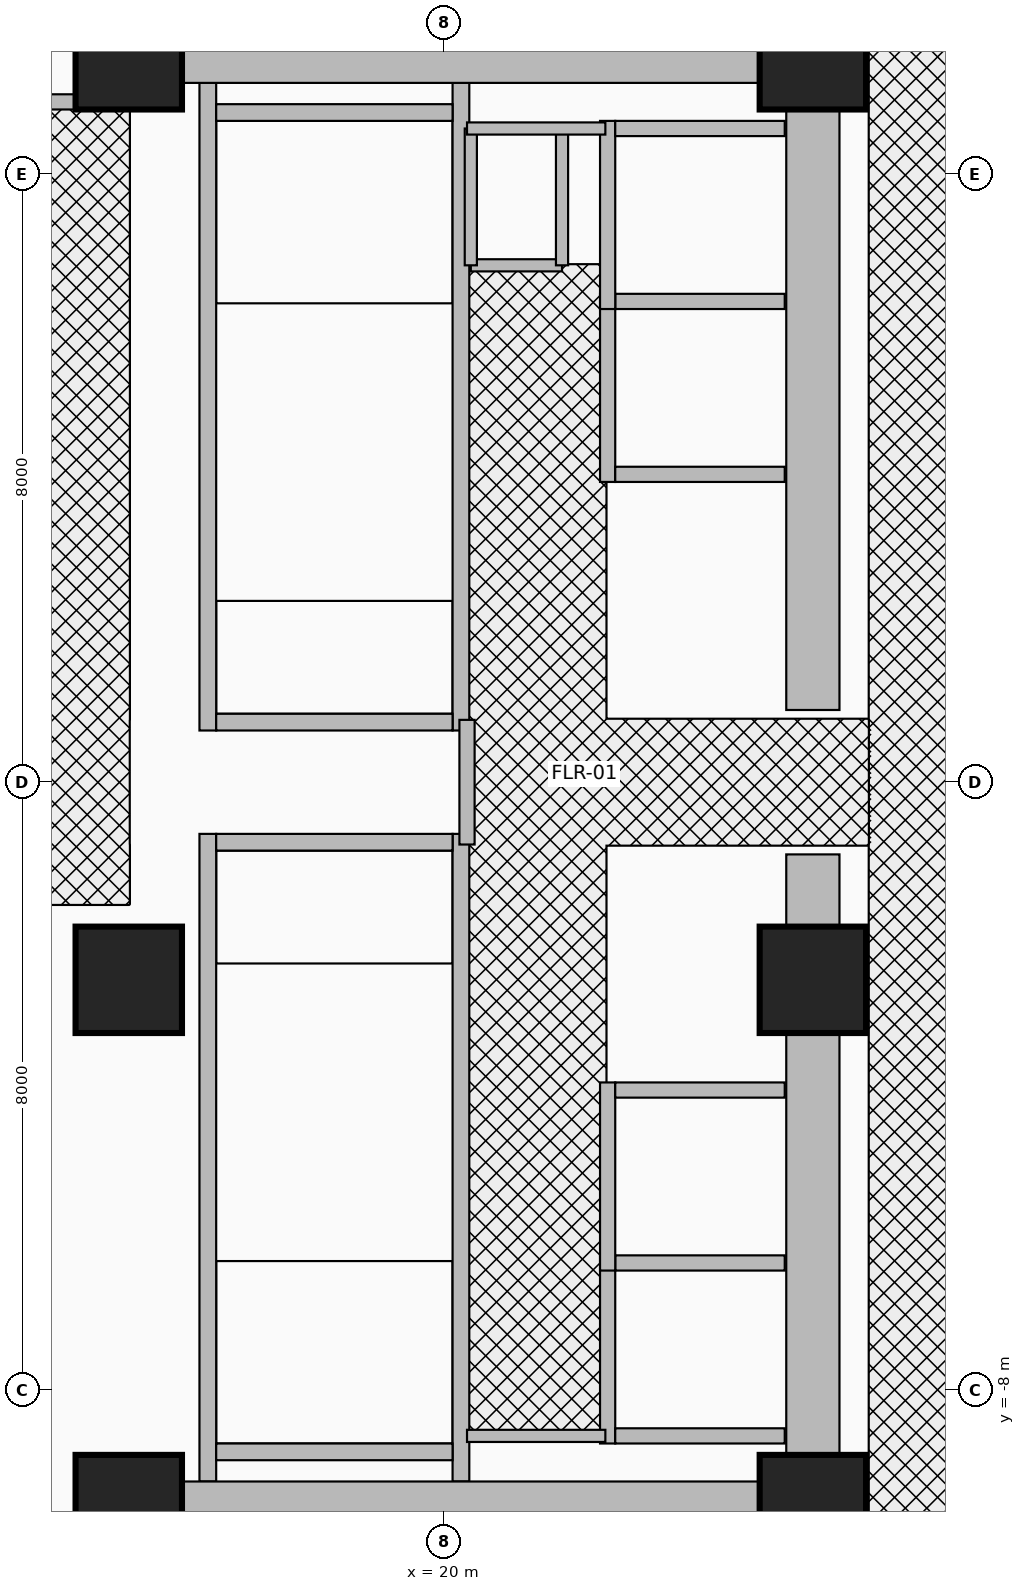
"""IFC4 building model, lengths in metres.
Left out: names, types, materials, properties, quantities, classifications, styles, units other than length and angle.
Written with IfcOpenShell. Run it as: python <this file> out.ifc"""

import sys

from ifc_helpers import new_model, si_unit, direction, frame, frame_2d, origin, origin_2d, place, context, subcontext, project, spatial, rectangle, extrude, source, transform, mapped, element, fill, save


model = new_model("IFC4")
c1 = context("Model", 3, precision=1e-05, world=origin(), true_north=direction((0.0, 1.0)))
c2 = subcontext(c1, "Body", "Model", "MODEL_VIEW")
j1 = project(units=[si_unit("LENGTHUNIT", "METRE"), si_unit("PLANEANGLEUNIT", "RADIAN")], contexts=[c1])
p1 = place(None, origin())
s1 = spatial("IfcSite", under=j1, at=p1, CompositionType="ELEMENT")
p2 = place(p1, origin())
s2 = spatial("IfcBuilding", under=s1, at=p2, CompositionType="ELEMENT")
p3 = place(p2, frame((0.0, 0.0, 20.8)))
s3 = spatial("IfcBuildingStorey", under=s2, at=p3, CompositionType="ELEMENT", Elevation=20.8)
for number, where, z_axis, x_axis in (
    (1, (16.89, 0.68, 0.0), (0.0, 0.0, 1.0), (0.0, 1.0, 0.0)),
    (2, (20.22, 0.68, 0.0), (0.0, 0.0, 1.0), (0.0, 1.0, 0.0)),
):
    element("IfcWall", number, at=place(p3, frame(where, z_axis=z_axis, x_axis=x_axis)), inside=s3, PredefinedType="SHEAR", context=c2, shape_type="SweptSolid", body=[
        extrude(rectangle(XDim=8.52, YDim=0.22, at=frame_2d((4.26, 0.0))), origin(), (0.0, 0.0, 1.0), 4.96),
    ])
p4 = place(p3, frame((17.0, 0.79, 0.0), z_axis=(0.0, 0.0, 1.0), x_axis=(1.0, 0.0, 0.0)))
e3 = element("IfcWall", 3, at=p4, inside=s3, PredefinedType="SHEAR", context=c2, shape_type="SweptSolid", body=[
    extrude(rectangle(XDim=3.11, YDim=0.22, at=frame_2d((1.555, 0.0))), origin(), (0.0, 0.0, 1.0), 4.96),
])
p5 = place(p4, frame((0.95, 0.0, 0.0)))
e4 = element("IfcOpeningElement", 4, at=p5, cuts=e3, PredefinedType="OPENING", context=c2, shape_type="SweptSolid", body=[
    extrude(rectangle(XDim=1.1, YDim=2.15, at=frame_2d((0.55, 1.075))), frame((0.0, 0.125, 0.0), z_axis=(0.0, -1.0, 0.0), x_axis=(1.0, 0.0, 0.0)), (0.0, 0.0, 1.0), 0.25),
])
p6 = place(p3, frame((17.0, 8.81, 0.0), z_axis=(0.0, 0.0, 1.0), x_axis=(1.0, 0.0, 0.0)))
e5 = element("IfcWall", 5, at=p6, inside=s3, PredefinedType="SHEAR", context=c2, shape_type="SweptSolid", body=[
    extrude(rectangle(XDim=3.11, YDim=0.22, at=frame_2d((1.555, 0.0))), origin(), (0.0, 0.0, 1.0), 4.96),
])
for number, where, z_axis, x_axis in (
    (6, (16.89, -9.2, 0.0), (0.0, 0.0, 1.0), (0.0, 1.0, 0.0)),
    (7, (20.22, -9.2, 0.0), (0.0, 0.0, 1.0), (0.0, 1.0, 0.0)),
):
    element("IfcWall", number, at=place(p3, frame(where, z_axis=z_axis, x_axis=x_axis)), inside=s3, PredefinedType="SHEAR", context=c2, shape_type="SweptSolid", body=[
        extrude(rectangle(XDim=8.52, YDim=0.22, at=frame_2d((4.26, 0.0))), origin(), (0.0, 0.0, 1.0), 4.96),
    ])
p7 = place(p3, frame((17.0, -8.81, 0.0), z_axis=(0.0, 0.0, 1.0), x_axis=(1.0, 0.0, 0.0)))
e8 = element("IfcWall", 8, at=p7, inside=s3, PredefinedType="SHEAR", context=c2, shape_type="SweptSolid", body=[
    extrude(rectangle(XDim=3.11, YDim=0.22, at=frame_2d((1.555, 0.0))), origin(), (0.0, 0.0, 1.0), 4.96),
])
p8 = place(p3, frame((17.0, -0.79, 0.0), z_axis=(0.0, 0.0, 1.0), x_axis=(1.0, 0.0, 0.0)))
e9 = element("IfcWall", 9, at=p8, inside=s3, PredefinedType="SHEAR", context=c2, shape_type="SweptSolid", body=[
    extrude(rectangle(XDim=3.11, YDim=0.22, at=frame_2d((1.555, 0.0))), origin(), (0.0, 0.0, 1.0), 4.96),
])
p9 = place(p8, frame((0.95, 0.0, 0.0)))
e10 = element("IfcOpeningElement", 10, at=p9, cuts=e9, PredefinedType="OPENING", context=c2, shape_type="SweptSolid", body=[
    extrude(rectangle(XDim=1.1, YDim=2.15, at=frame_2d((0.55, 1.075))), frame((0.0, 0.125, 0.0), z_axis=(0.0, -1.0, 0.0), x_axis=(1.0, 0.0, 0.0)), (0.0, 0.0, 1.0), 0.25),
])
for number, where, z_axis, x_axis in (
    (11, (24.85, -9.9, 0.0), (0.0, 0.0, 1.0), (0.0, 1.0, 0.0)),
    (12, (24.85, 0.95, 0.0), (0.0, 0.0, 1.0), (0.0, 1.0, 0.0)),
):
    element("IfcWall", number, at=place(p3, frame(where, z_axis=z_axis, x_axis=x_axis)), inside=s3, PredefinedType="SHEAR", context=c2, shape_type="SweptSolid", body=[
        extrude(rectangle(XDim=8.95, YDim=0.7, at=frame_2d((4.475, 0.0))), origin(), (0.0, 0.0, 1.0), 4.96),
    ])
for number, where, z_axis, x_axis in (
    (13, (15.85, 9.55, 0.0), (0.0, 0.0, 1.0), (1.0, 0.0, 0.0)),
    (14, (15.85, -9.55, 0.0), (0.0, 0.0, 1.0), (1.0, 0.0, 0.0)),
):
    element("IfcWall", number, at=place(p3, frame(where, z_axis=z_axis, x_axis=x_axis)), inside=s3, PredefinedType="SHEAR", context=c2, shape_type="SweptSolid", body=[
        extrude(rectangle(XDim=9.0, YDim=0.7, at=frame_2d((4.5, 0.0))), origin(), (0.0, 0.0, 1.0), 4.96),
    ])
m1 = source(origin(), c2, "Body", "SweptSolid", [
    extrude(rectangle(XDim=1.4, YDim=1.4, at=origin_2d()), origin(), (0.0, 0.0, 1.0), 5.2),
])
for number, where, z_axis, x_axis in (
    (15, (15.85, -9.55, 0.0), (0.0, 0.0, 1.0), (1.0, 0.0, 0.0)),
    (16, (24.85, -9.55, 0.0), (0.0, 0.0, 1.0), (1.0, 0.0, 0.0)),
    (17, (15.85, -2.6, 0.0), (0.0, 0.0, 1.0), (1.0, 0.0, 0.0)),
    (18, (24.85, -2.6, 0.0), (0.0, 0.0, 1.0), (1.0, 0.0, 0.0)),
    (19, (15.85, 9.55, 0.0), (0.0, 0.0, 1.0), (1.0, 0.0, 0.0)),
    (20, (24.85, 9.55, 0.0), (0.0, 0.0, 1.0), (1.0, 0.0, 0.0)),
):
    element("IfcColumn", number, at=place(p3, frame(where, z_axis=z_axis, x_axis=x_axis)), inside=s3, PredefinedType="COLUMN", context=c2, shape_type="MappedRepresentation", body=[
        mapped(m1, transform((0.0, 0.0, 0.0), x_axis=(1.0, 0.0, 0.0), y_axis=(0.0, 1.0, 0.0), z_axis=(0.0, 0.0, 1.0), scale=1.0)),
    ])
p10 = place(p3, frame((22.15, -8.7, 0.0), z_axis=(0.0, 0.0, 1.0), x_axis=(0.0, 1.0, 0.0)))
e21 = element("IfcWall", 21, at=p10, inside=s3, PredefinedType="MOVABLE", context=c2, shape_type="SweptSolid", body=[
    extrude(rectangle(XDim=2.475, YDim=0.2, at=frame_2d((1.237, 0.0))), origin(), (0.0, 0.0, 1.0), 4.96),
])
p11 = place(p10, frame((0.688, 0.0, 0.0)))
e22 = element("IfcOpeningElement", 22, at=p11, cuts=e21, PredefinedType="OPENING", context=c2, shape_type="SweptSolid", body=[
    extrude(rectangle(XDim=1.1, YDim=2.1, at=frame_2d((0.55, 1.05))), frame((0.0, 0.115, 0.0), z_axis=(0.0, -1.0, 0.0), x_axis=(1.0, 0.0, 0.0)), (0.0, 0.0, 1.0), 0.23),
])
for number, where, z_axis, x_axis in (
    (23, (22.25, -8.6, 0.0), (0.0, 0.0, 1.0), (1.0, 0.0, 0.0)),
    (24, (22.25, -6.325, 0.0), (0.0, 0.0, 1.0), (1.0, 0.0, 0.0)),
):
    element("IfcWall", number, at=place(p3, frame(where, z_axis=z_axis, x_axis=x_axis)), inside=s3, PredefinedType="MOVABLE", context=c2, shape_type="SweptSolid", body=[
        extrude(rectangle(XDim=2.23, YDim=0.2, at=frame_2d((1.115, 0.0))), origin(), (0.0, 0.0, 1.0), 4.96),
    ])
p12 = place(p3, frame((22.15, -6.425, 0.0), z_axis=(0.0, 0.0, 1.0), x_axis=(0.0, 1.0, 0.0)))
e25 = element("IfcWall", 25, at=p12, inside=s3, PredefinedType="MOVABLE", context=c2, shape_type="SweptSolid", body=[
    extrude(rectangle(XDim=2.475, YDim=0.2, at=frame_2d((1.238, 0.0))), origin(), (0.0, 0.0, 1.0), 4.96),
])
p13 = place(p12, frame((0.688, 0.0, 0.0)))
e26 = element("IfcOpeningElement", 26, at=p13, cuts=e25, PredefinedType="OPENING", context=c2, shape_type="SweptSolid", body=[
    extrude(rectangle(XDim=1.1, YDim=2.1, at=frame_2d((0.55, 1.05))), frame((0.0, 0.115, 0.0), z_axis=(0.0, -1.0, 0.0), x_axis=(1.0, 0.0, 0.0)), (0.0, 0.0, 1.0), 0.23),
])
p14 = place(p3, frame((22.25, -4.05, 0.0), z_axis=(0.0, 0.0, 1.0), x_axis=(1.0, 0.0, 0.0)))
e27 = element("IfcWall", 27, at=p14, inside=s3, PredefinedType="MOVABLE", context=c2, shape_type="SweptSolid", body=[
    extrude(rectangle(XDim=2.23, YDim=0.2, at=frame_2d((1.115, 0.0))), origin(), (0.0, 0.0, 1.0), 4.96),
])
p15 = place(p3, frame((22.15, 3.95, 0.0), z_axis=(0.0, 0.0, 1.0), x_axis=(0.0, 1.0, 0.0)))
e28 = element("IfcWall", 28, at=p15, inside=s3, PredefinedType="MOVABLE", context=c2, shape_type="SweptSolid", body=[
    extrude(rectangle(XDim=2.475, YDim=0.2, at=frame_2d((1.238, 0.0))), origin(), (0.0, 0.0, 1.0), 4.96),
])
for number, where, z_axis, x_axis in (
    (29, (22.25, 4.05, 0.0), (0.0, 0.0, 1.0), (1.0, 0.0, 0.0)),
    (30, (22.25, 6.325, 0.0), (0.0, 0.0, 1.0), (1.0, 0.0, 0.0)),
):
    element("IfcWall", number, at=place(p3, frame(where, z_axis=z_axis, x_axis=x_axis)), inside=s3, PredefinedType="MOVABLE", context=c2, shape_type="SweptSolid", body=[
        extrude(rectangle(XDim=2.23, YDim=0.2, at=frame_2d((1.115, 0.0))), origin(), (0.0, 0.0, 1.0), 3.745),
    ])
p16 = place(p3, frame((22.15, 6.225, 0.0), z_axis=(0.0, 0.0, 1.0), x_axis=(0.0, 1.0, 0.0)))
e31 = element("IfcWall", 31, at=p16, inside=s3, PredefinedType="MOVABLE", context=c2, shape_type="SweptSolid", body=[
    extrude(rectangle(XDim=2.475, YDim=0.2, at=frame_2d((1.237, 0.0))), origin(), (0.0, 0.0, 1.0), 4.96),
])
p17 = place(p3, frame((22.25, 8.6, 0.0), z_axis=(0.0, 0.0, 1.0), x_axis=(1.0, 0.0, 0.0)))
e32 = element("IfcWall", 32, at=p17, inside=s3, PredefinedType="MOVABLE", context=c2, shape_type="SweptSolid", body=[
    extrude(rectangle(XDim=2.23, YDim=0.2, at=frame_2d((1.115, 0.0))), origin(), (0.0, 0.0, 1.0), 3.745),
])
p18 = place(p3, frame((20.3, -0.82, 0.0), z_axis=(0.0, 0.0, 1.0), x_axis=(0.0, 1.0, 0.0)))
e33 = element("IfcWall", 33, at=p18, inside=s3, PredefinedType="PARTITIONING", context=c2, shape_type="SweptSolid", body=[
    extrude(rectangle(XDim=1.64, YDim=0.2, at=frame_2d((0.82, 0.0))), origin(), (0.0, 0.0, 1.0), 4.96),
])
p19 = place(p18, frame((0.295, 0.0, 0.0)))
e34 = element("IfcOpeningElement", 34, at=p19, cuts=e33, PredefinedType="OPENING", context=c2, shape_type="SweptSolid", body=[
    extrude(rectangle(XDim=1.05, YDim=2.15, at=frame_2d((0.525, 1.075))), frame((0.0, 0.115, 0.0), z_axis=(0.0, -1.0, 0.0), x_axis=(1.0, 0.0, 0.0)), (0.0, 0.0, 1.0), 0.23),
])
p20 = place(p3, frame((20.35, 6.8, 0.0), z_axis=(0.0, 0.0, 1.0), x_axis=(1.0, 0.0, 0.0)))
e35 = element("IfcWall", 35, at=p20, inside=s3, PredefinedType="PARTITIONING", context=c2, shape_type="SweptSolid", body=[
    extrude(rectangle(XDim=1.2, YDim=0.16, at=frame_2d((0.6, 0.0))), origin(), (0.0, 0.0, 1.0), 4.96),
])
p21 = place(p20, frame((0.175, 0.0, 0.0)))
e36 = element("IfcOpeningElement", 36, at=p21, cuts=e35, PredefinedType="OPENING", context=c2, shape_type="SweptSolid", body=[
    extrude(rectangle(XDim=0.85, YDim=2.05, at=frame_2d((0.425, 1.025))), frame((0.0, 0.095, 0.0), z_axis=(0.0, -1.0, 0.0), x_axis=(1.0, 0.0, 0.0)), (0.0, 0.0, 1.0), 0.19),
])
for number, where, z_axis, x_axis in (
    (37, (21.55, 6.8, 0.0), (0.0, 0.0, 1.0), (0.0, 1.0, 0.0)),
    (38, (20.35, 6.8, 0.0), (0.0, 0.0, 1.0), (0.0, 1.0, 0.0)),
):
    element("IfcWall", number, at=place(p3, frame(where, z_axis=z_axis, x_axis=x_axis)), inside=s3, PredefinedType="PARTITIONING", context=c2, shape_type="SweptSolid", body=[
        extrude(rectangle(XDim=1.8, YDim=0.16, at=frame_2d((0.9, 0.0))), origin(), (0.0, 0.0, 1.0), 4.96),
    ])
for number, where, z_axis, x_axis in (
    (39, (20.3, -8.6, 0.0), (0.0, 0.0, 1.0), (1.0, 0.0, 0.0)),
    (40, (20.3, 8.6, 0.0), (0.0, 0.0, 1.0), (1.0, 0.0, 0.0)),
):
    element("IfcWall", number, at=place(p3, frame(where, z_axis=z_axis, x_axis=x_axis)), inside=s3, PredefinedType="PARTITIONING", context=c2, shape_type="SweptSolid", body=[
        extrude(rectangle(XDim=1.82, YDim=0.16, at=frame_2d((0.91, 0.0))), origin(), (0.0, 0.0, 1.0), 4.96),
    ])
p22 = place(p3, frame((-11.55, 8.95, 0.0), z_axis=(0.0, 0.0, 1.0), x_axis=(1.0, 0.0, 0.0)))
e41 = element("IfcWall", 41, at=p22, inside=s3, PredefinedType="PARTITIONING", context=c2, shape_type="SweptSolid", body=[
    extrude(rectangle(XDim=27.4, YDim=0.2, at=frame_2d((13.7, 0.0))), origin(), (0.0, 0.0, 1.0), 3.745),
])
p23 = place(p3, frame((15.85, 8.95, 0.0), z_axis=(0.0, 0.0, 1.0), x_axis=(0.0, 1.0, 0.0)))
e42 = element("IfcWall", 42, at=p23, inside=s3, PredefinedType="PARTITIONING", context=c2, shape_type="SweptSolid", body=[
    extrude(rectangle(XDim=6.7, YDim=0.2, at=frame_2d((3.35, 0.0))), origin(), (0.0, 0.0, 1.0), 3.745),
])
p24 = place(p11, origin())
e43 = element("IfcDoor", 43, at=p24, inside=s3, OperationType="DOUBLE_DOOR_SLIDING", PredefinedType="DOOR", context=c2, shape_type="SweptSolid", body=[
    extrude(rectangle(XDim=1.1, YDim=2.1, at=frame_2d((0.55, 1.05))), frame((0.0, 0.025, 0.0), z_axis=(0.0, -1.0, 0.0), x_axis=(1.0, 0.0, 0.0)), (0.0, 0.0, 1.0), 0.05),
])
fill(e22, e43)
p25 = place(p13, origin())
e44 = element("IfcDoor", 44, at=p25, inside=s3, OperationType="DOUBLE_DOOR_SLIDING", PredefinedType="DOOR", context=c2, shape_type="SweptSolid", body=[
    extrude(rectangle(XDim=1.1, YDim=2.1, at=frame_2d((0.55, 1.05))), frame((0.0, 0.025, 0.0), z_axis=(0.0, -1.0, 0.0), x_axis=(1.0, 0.0, 0.0)), (0.0, 0.0, 1.0), 0.05),
])
fill(e26, e44)
p26 = place(p19, frame((1.05, 0.0, 0.0), z_axis=(0.0, 0.0, 1.0), x_axis=(-1.0, 0.0, 0.0)))
e45 = element("IfcDoor", 45, at=p26, inside=s3, OperationType="SINGLE_SWING_LEFT", PredefinedType="DOOR", context=c2, shape_type="SweptSolid", body=[
    extrude(rectangle(XDim=1.05, YDim=2.15, at=frame_2d((0.525, 1.075))), frame((0.0, 0.025, 0.0), z_axis=(0.0, -1.0, 0.0), x_axis=(1.0, 0.0, 0.0)), (0.0, 0.0, 1.0), 0.05),
])
fill(e34, e45)
p27 = place(p5, origin())
e46 = element("IfcDoor", 46, at=p27, inside=s3, OperationType="SINGLE_SWING_RIGHT", PredefinedType="DOOR", context=c2, shape_type="SweptSolid", body=[
    extrude(rectangle(XDim=1.1, YDim=2.15, at=frame_2d((0.55, 1.075))), frame((0.0, 0.025, 0.0), z_axis=(0.0, -1.0, 0.0), x_axis=(1.0, 0.0, 0.0)), (0.0, 0.0, 1.0), 0.05),
])
fill(e4, e46)
p28 = place(p9, frame((1.1, 0.0, 0.0), z_axis=(0.0, 0.0, 1.0), x_axis=(-1.0, 0.0, 0.0)))
e47 = element("IfcDoor", 47, at=p28, inside=s3, OperationType="SINGLE_SWING_LEFT", PredefinedType="DOOR", context=c2, shape_type="SweptSolid", body=[
    extrude(rectangle(XDim=1.1, YDim=2.15, at=frame_2d((0.55, 1.075))), frame((0.0, 0.025, 0.0), z_axis=(0.0, -1.0, 0.0), x_axis=(1.0, 0.0, 0.0)), (0.0, 0.0, 1.0), 0.05),
])
fill(e10, e47)
p29 = place(p21, origin())
e48 = element("IfcDoor", 48, at=p29, inside=s3, OperationType="SINGLE_SWING_RIGHT", PredefinedType="DOOR", context=c2, shape_type="SweptSolid", body=[
    extrude(rectangle(XDim=0.85, YDim=2.05, at=frame_2d((0.425, 1.025))), frame((0.0, 0.025, 0.0), z_axis=(0.0, -1.0, 0.0), x_axis=(1.0, 0.0, 0.0)), (0.0, 0.0, 1.0), 0.05),
])
fill(e36, e48)
save(model, sys.argv[1])
